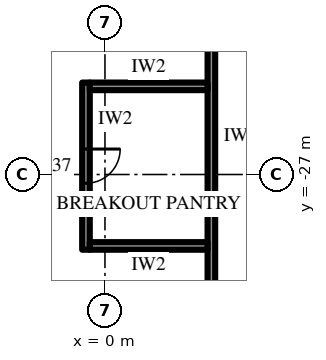
"""IFC4 building model, lengths in metres.
Left out: names, types, materials, properties, quantities, classifications, styles, units other than length and angle.
Written with IfcOpenShell. Run it as: python <this file> out.ifc"""

import sys

from ifc_helpers import new_model, si_unit, direction, frame, frame_2d, origin, place, context, subcontext, project, spatial, rectangle, extrude, element, fill, save


model = new_model("IFC4")
c1 = context("Model", 3, precision=1e-05, world=origin(), true_north=direction((0.0, 1.0)))
c2 = subcontext(c1, "Body", "Model", "MODEL_VIEW")
j1 = project(units=[si_unit("LENGTHUNIT", "METRE"), si_unit("PLANEANGLEUNIT", "RADIAN")], contexts=[c1])
p1 = place(None, origin())
s1 = spatial("IfcSite", under=j1, at=p1, CompositionType="ELEMENT")
p2 = place(p1, origin())
s2 = spatial("IfcBuilding", under=s1, at=p2, CompositionType="ELEMENT")
p3 = place(p2, frame((0.0, 0.0, 27.7)))
s3 = spatial("IfcBuildingStorey", under=s2, at=p3, CompositionType="ELEMENT", Elevation=27.7)
p4 = place(p3, frame((2.8, -18.2, 0.0), z_axis=(0.0, 0.0, 1.0), x_axis=(0.0, -1.0, 0.0)))
e1 = element("IfcWall", 1, at=p4, inside=s3, PredefinedType="PARTITIONING", context=c2, shape_type="SweptSolid", body=[
    extrude(rectangle(XDim=15.6, YDim=0.2, at=frame_2d((7.8, 0.0))), origin(), (0.0, 0.0, 1.0), 2.944),
])
p5 = place(p3, frame((-0.5, -24.58, 0.0), z_axis=(0.0, 0.0, 1.0), x_axis=(0.0, -1.0, 0.0)))
e2 = element("IfcWall", 2, at=p5, inside=s3, PredefinedType="PARTITIONING", context=c2, shape_type="SweptSolid", body=[
    extrude(rectangle(XDim=4.4, YDim=0.2, at=frame_2d((2.2, 0.0))), origin(), (0.0, 0.0, 1.0), 4.0),
])
p6 = place(p5, frame((1.75, 0.0, 0.0)))
e3 = element("IfcOpeningElement", 3, at=p6, cuts=e2, PredefinedType="OPENING", context=c2, shape_type="SweptSolid", body=[
    extrude(rectangle(XDim=0.9, YDim=2.2, at=frame_2d((0.45, 1.1))), frame((0.0, 0.11, 0.0), z_axis=(0.0, -1.0, 0.0), x_axis=(1.0, 0.0, 0.0)), (0.0, 0.0, 1.0), 0.22),
])
for number, where, z_axis, x_axis in (
    (4, (2.7, -24.68, 0.0), (0.0, 0.0, 1.0), (-1.0, 0.0, 0.0)),
    (5, (2.7, -28.88, 0.0), (0.0, 0.0, 1.0), (-1.0, 0.0, 0.0)),
):
    element("IfcWall", number, at=place(p3, frame(where, z_axis=z_axis, x_axis=x_axis)), inside=s3, PredefinedType="PARTITIONING", context=c2, shape_type="SweptSolid", body=[
        extrude(rectangle(XDim=3.1, YDim=0.2, at=frame_2d((1.55, 0.0))), origin(), (0.0, 0.0, 1.0), 4.0),
    ])
p7 = place(p6, origin())
e6 = element("IfcDoor", 6, at=p7, inside=s3, OperationType="SINGLE_SWING_RIGHT", PredefinedType="DOOR", context=c2, shape_type="SweptSolid", body=[
    extrude(rectangle(XDim=0.9, YDim=2.2, at=frame_2d((0.45, 1.1))), frame((0.0, 0.025, 0.0), z_axis=(0.0, -1.0, 0.0), x_axis=(1.0, 0.0, 0.0)), (0.0, 0.0, 1.0), 0.05),
])
fill(e3, e6)
save(model, sys.argv[1])
